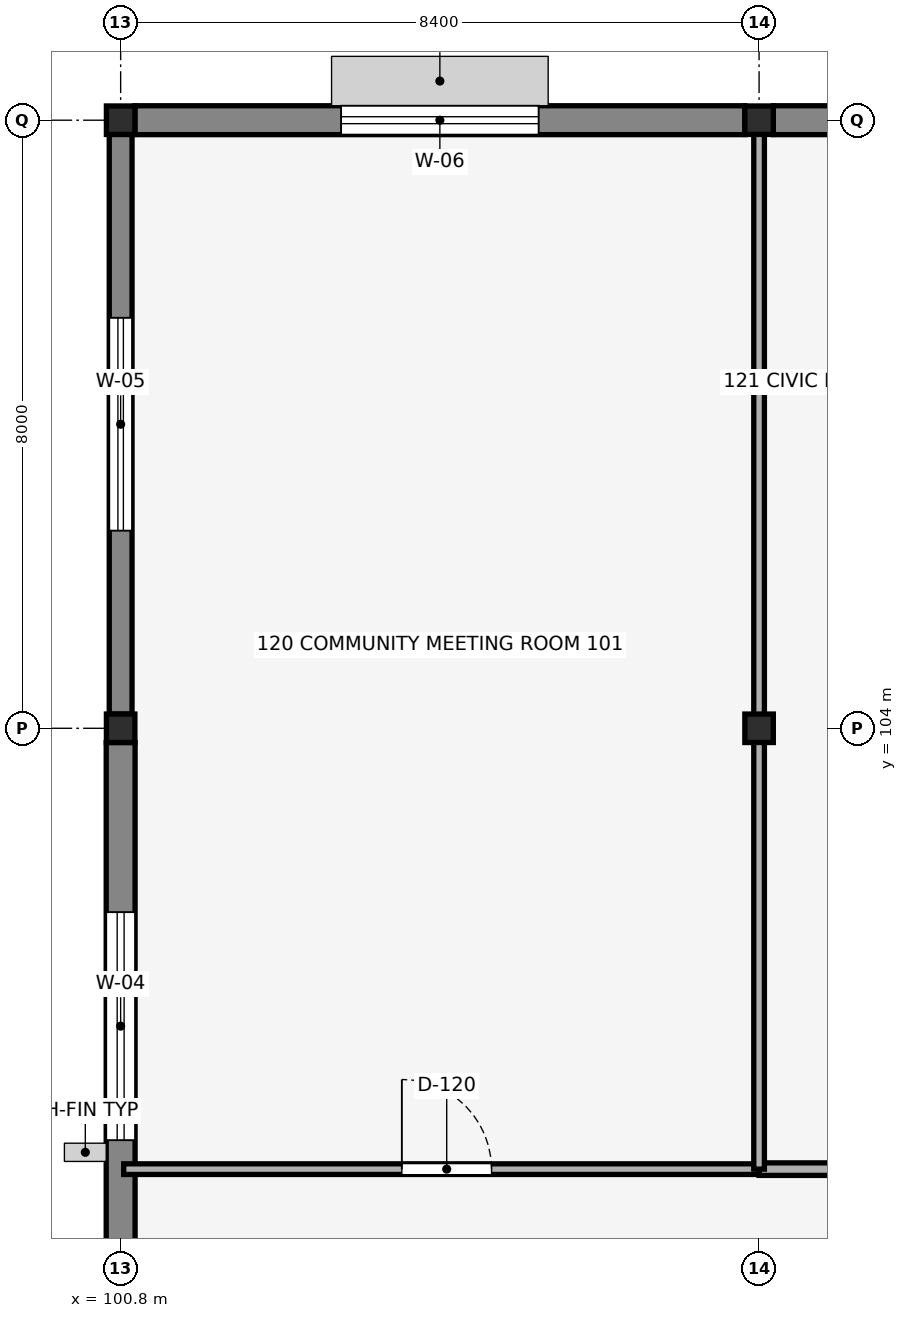
"""IFC4 building model, lengths in metres.
Left out: names, types, materials, properties, quantities, classifications, styles, units other than length and angle.
Written with IfcOpenShell. Run it as: python <this file> out.ifc"""

import sys

from ifc_helpers import new_model, si_unit, direction, frame, frame_2d, origin, origin_2d, place, context, subcontext, project, spatial, rectangle, i_section, extrude, element, fill, save


model = new_model("IFC4")
c1 = context("Model", 3, precision=1e-05, world=origin(), true_north=direction((0.0, 1.0)))
c2 = subcontext(c1, "Body", "Model", "MODEL_VIEW")
j1 = project(units=[si_unit("LENGTHUNIT", "METRE"), si_unit("PLANEANGLEUNIT", "RADIAN")], contexts=[c1])
p1 = place(None, origin())
s1 = spatial("IfcSite", under=j1, at=p1, CompositionType="ELEMENT")
p2 = place(p1, origin())
s2 = spatial("IfcBuilding", under=s1, at=p2, CompositionType="ELEMENT")
p3 = place(p2, frame((0.0, 0.0, 5.44)))
s3 = spatial("IfcBuildingStorey", under=s2, at=p3, CompositionType="ELEMENT", Elevation=5.44)
for number, where, z_axis, x_axis in (
    (1, (100.8, 104.0, 0.0), (0.0, 0.0, 1.0), (1.0, 0.0, 0.0)),
    (2, (100.8, 112.0, 0.0), (0.0, 0.0, 1.0), (1.0, 0.0, 0.0)),
    (3, (109.2, 104.0, 0.0), (0.0, 0.0, 1.0), (1.0, 0.0, 0.0)),
    (4, (109.2, 112.0, 0.0), (0.0, 0.0, 1.0), (1.0, 0.0, 0.0)),
):
    element("IfcColumn", number, at=place(p3, frame(where, z_axis=z_axis, x_axis=x_axis)), inside=s3, PredefinedType="COLUMN", context=c2, shape_type="SweptSolid", body=[
        extrude(i_section(OverallWidth=0.375, OverallDepth=0.375, WebThickness=0.017, FlangeThickness=0.027, FilletRadius=0.015, at=origin_2d()), origin(), (0.0, 0.0, 1.0), 3.8),
    ])
p4 = place(p3, frame((100.8, 96.35, 0.0), z_axis=(0.0, 0.0, 1.0), x_axis=(0.0, 1.0, 0.0)))
e5 = element("IfcWall", 5, at=p4, inside=s3, PredefinedType="SOLIDWALL", context=c2, shape_type="SweptSolid", body=[
    extrude(rectangle(XDim=7.463, YDim=0.38, at=frame_2d((3.731, 0.0))), origin(), (0.0, 0.0, 1.0), 3.442),
])
p5 = place(p4, frame((2.231, 0.0, 0.9), z_axis=(0.0, 0.0, 1.0), x_axis=(1.0, 0.0, 0.0)))
e6 = element("IfcOpeningElement", 6, at=p5, cuts=e5, PredefinedType="OPENING", context=c2, shape_type="SweptSolid", body=[
    extrude(rectangle(XDim=3.0, YDim=1.65, at=frame_2d((1.5, 0.825))), frame((0.0, 0.2, 0.0), z_axis=(0.0, -1.0, 0.0), x_axis=(1.0, 0.0, 0.0)), (0.0, 0.0, 1.0), 0.4),
])
p6 = place(p3, frame((100.8, 104.187, 0.0), z_axis=(0.0, 0.0, 1.0), x_axis=(0.0, 1.0, 0.0)))
e7 = element("IfcWall", 7, at=p6, inside=s3, PredefinedType="SOLIDWALL", context=c2, shape_type="SweptSolid", body=[
    extrude(rectangle(XDim=7.625, YDim=0.3, at=frame_2d((3.813, 0.0))), origin(), (0.0, 0.0, 1.0), 3.442),
])
p7 = place(p6, frame((2.413, 0.0, 0.9), z_axis=(0.0, 0.0, 1.0), x_axis=(1.0, 0.0, 0.0)))
e8 = element("IfcOpeningElement", 8, at=p7, cuts=e7, PredefinedType="OPENING", context=c2, shape_type="SweptSolid", body=[
    extrude(rectangle(XDim=2.8, YDim=1.6, at=frame_2d((1.4, 0.8))), frame((0.0, 0.16, 0.0), z_axis=(0.0, -1.0, 0.0), x_axis=(1.0, 0.0, 0.0)), (0.0, 0.0, 1.0), 0.32),
])
p8 = place(p3, frame((100.987, 112.0, 0.0), z_axis=(0.0, 0.0, 1.0), x_axis=(1.0, 0.0, 0.0)))
e9 = element("IfcWall", 9, at=p8, inside=s3, PredefinedType="SOLIDWALL", context=c2, shape_type="SweptSolid", body=[
    extrude(rectangle(XDim=8.025, YDim=0.38, at=frame_2d((4.013, 0.0))), origin(), (0.0, 0.0, 1.0), 3.45),
])
p9 = place(p8, frame((2.713, 0.0, 0.9), z_axis=(0.0, 0.0, 1.0), x_axis=(1.0, 0.0, 0.0)))
e10 = element("IfcOpeningElement", 10, at=p9, cuts=e9, PredefinedType="OPENING", context=c2, shape_type="SweptSolid", body=[
    extrude(rectangle(XDim=2.6, YDim=1.8, at=frame_2d((1.3, 0.9))), frame((0.0, 0.2, 0.0), z_axis=(0.0, -1.0, 0.0), x_axis=(1.0, 0.0, 0.0)), (0.0, 0.0, 1.0), 0.4),
])
p10 = place(p3, frame((109.387, 112.0, 0.0), z_axis=(0.0, 0.0, 1.0), x_axis=(1.0, 0.0, 0.0)))
e11 = element("IfcWall", 11, at=p10, inside=s3, PredefinedType="SOLIDWALL", context=c2, shape_type="SweptSolid", body=[
    extrude(rectangle(XDim=8.025, YDim=0.38, at=frame_2d((4.013, 0.0))), origin(), (0.0, 0.0, 1.0), 3.45),
])
p11 = place(p10, frame((2.813, 0.0, 0.9), z_axis=(0.0, 0.0, 1.0), x_axis=(1.0, 0.0, 0.0)))
e12 = element("IfcOpeningElement", 12, at=p11, cuts=e11, PredefinedType="OPENING", context=c2, shape_type="SweptSolid", body=[
    extrude(rectangle(XDim=2.4, YDim=1.75, at=frame_2d((1.2, 0.875))), frame((0.0, 0.2, 0.0), z_axis=(0.0, -1.0, 0.0), x_axis=(1.0, 0.0, 0.0)), (0.0, 0.0, 1.0), 0.4),
])
p12 = place(p3, frame((100.84, 98.2, 0.0), z_axis=(0.0, 0.0, 1.0), x_axis=(1.0, 0.0, 0.0)))
e13 = element("IfcWall", 13, at=p12, inside=s3, PredefinedType="PARTITIONING", context=c2, shape_type="SweptSolid", body=[
    extrude(rectangle(XDim=8.36, YDim=0.14, at=frame_2d((4.18, 0.0))), origin(), (0.0, 0.0, 1.0), 3.8),
])
p13 = place(p12, frame((3.66, 0.0, 0.0), z_axis=(0.0, 0.0, 1.0), x_axis=(1.0, 0.0, 0.0)))
e14 = element("IfcOpeningElement", 14, at=p13, cuts=e13, PredefinedType="OPENING", context=c2, shape_type="SweptSolid", body=[
    extrude(rectangle(XDim=1.18, YDim=2.22, at=frame_2d((0.59, 1.11))), frame((0.0, 0.08, 0.0), z_axis=(0.0, -1.0, 0.0), x_axis=(1.0, 0.0, 0.0)), (0.0, 0.0, 1.0), 0.16),
])
p14 = place(p3, frame((109.2, 98.2, 0.0), z_axis=(0.0, 0.0, 1.0), x_axis=(1.0, 0.0, 0.0)))
e15 = element("IfcWall", 15, at=p14, inside=s3, PredefinedType="PARTITIONING", context=c2, shape_type="SweptSolid", body=[
    extrude(rectangle(XDim=25.2, YDim=0.165, at=frame_2d((12.6, 0.0))), origin(), (0.0, 0.0, 1.0), 3.8),
])
p15 = place(p14, frame((3.7, 0.0, 0.0), z_axis=(0.0, 0.0, 1.0), x_axis=(1.0, 0.0, 0.0)))
e16 = element("IfcOpeningElement", 16, at=p15, cuts=e15, PredefinedType="OPENING", context=c2, shape_type="SweptSolid", body=[
    extrude(rectangle(XDim=1.1, YDim=2.2, at=frame_2d((0.55, 1.1))), frame((0.0, 0.093, 0.0), z_axis=(0.0, -1.0, 0.0), x_axis=(1.0, 0.0, 0.0)), (0.0, 0.0, 1.0), 0.185),
])
p16 = place(p3, frame((109.2, 98.2, 0.0), z_axis=(0.0, 0.0, 1.0), x_axis=(0.0, 1.0, 0.0)))
e17 = element("IfcWall", 17, at=p16, inside=s3, PredefinedType="PARTITIONING", context=c2, shape_type="SweptSolid", body=[
    extrude(rectangle(XDim=5.623, YDim=0.14, at=frame_2d((2.812, 0.0))), origin(), (0.0, 0.0, 1.0), 3.337),
])
p17 = place(p3, frame((109.2, 104.177, 0.0), z_axis=(0.0, 0.0, 1.0), x_axis=(0.0, 1.0, 0.0)))
e18 = element("IfcWall", 18, at=p17, inside=s3, PredefinedType="PARTITIONING", context=c2, shape_type="SweptSolid", body=[
    extrude(rectangle(XDim=7.646, YDim=0.14, at=frame_2d((3.823, 0.0))), origin(), (0.0, 0.0, 1.0), 3.337),
])
p18 = place(p5, origin())
e19 = element("IfcWindow", 19, at=p18, inside=s3, PartitioningType="DOUBLE_PANEL_VERTICAL", PredefinedType="WINDOW", context=c2, shape_type="SweptSolid", body=[
    extrude(rectangle(XDim=3.0, YDim=1.65, at=frame_2d((1.5, 0.825))), frame((0.0, 0.03, 0.0), z_axis=(0.0, -1.0, 0.0), x_axis=(1.0, 0.0, 0.0)), (0.0, 0.0, 1.0), 0.06),
])
fill(e6, e19)
p19 = place(p7, origin())
e20 = element("IfcWindow", 20, at=p19, inside=s3, PartitioningType="DOUBLE_PANEL_VERTICAL", PredefinedType="WINDOW", context=c2, shape_type="SweptSolid", body=[
    extrude(rectangle(XDim=2.8, YDim=1.6, at=frame_2d((1.4, 0.8))), frame((0.0, 0.03, 0.0), z_axis=(0.0, -1.0, 0.0), x_axis=(1.0, 0.0, 0.0)), (0.0, 0.0, 1.0), 0.06),
])
fill(e8, e20)
p20 = place(p9, origin())
e21 = element("IfcWindow", 21, at=p20, inside=s3, PartitioningType="DOUBLE_PANEL_VERTICAL", PredefinedType="WINDOW", context=c2, shape_type="SweptSolid", body=[
    extrude(rectangle(XDim=2.6, YDim=1.8, at=frame_2d((1.3, 0.9))), frame((0.0, 0.03, 0.0), z_axis=(0.0, -1.0, 0.0), x_axis=(1.0, 0.0, 0.0)), (0.0, 0.0, 1.0), 0.06),
])
fill(e10, e21)
p21 = place(p13, origin())
e22 = element("IfcDoor", 22, at=p21, inside=s3, OperationType="SINGLE_SWING_LEFT", PredefinedType="DOOR", context=c2, shape_type="SweptSolid", body=[
    extrude(rectangle(XDim=1.18, YDim=2.22, at=frame_2d((0.59, 1.11))), frame((0.0, 0.025, 0.0), z_axis=(0.0, -1.0, 0.0), x_axis=(1.0, 0.0, 0.0)), (0.0, 0.0, 1.0), 0.05),
])
fill(e14, e22)
save(model, sys.argv[1])
